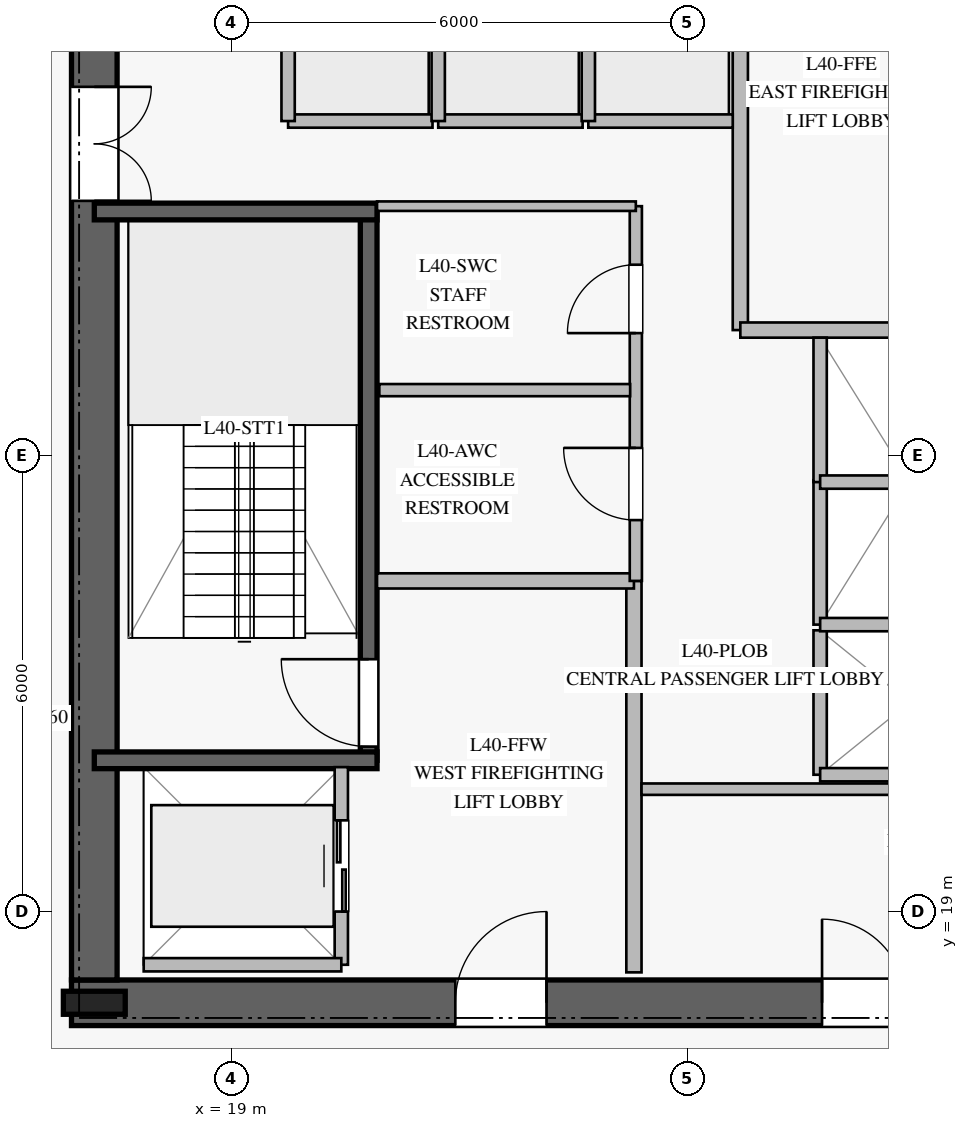
"""IFC4 building model, lengths in metres.
Left out: names, types, materials, properties, quantities, classifications, styles, units other than length and angle.
Written with IfcOpenShell. Run it as: python <this file> out.ifc"""

import sys

from ifc_helpers import new_model, si_unit, direction, frame, frame_2d, origin, origin_2d, place, context, subcontext, project, spatial, rectangle, i_section, extrude, element, fill, save


model = new_model("IFC4")
c1 = context("Model", 3, precision=1e-05, world=origin(), true_north=direction((0.0, 1.0)))
c2 = subcontext(c1, "Body", "Model", "MODEL_VIEW")
j1 = project(units=[si_unit("LENGTHUNIT", "METRE"), si_unit("PLANEANGLEUNIT", "RADIAN")], contexts=[c1])
p1 = place(None, origin())
s1 = spatial("IfcSite", under=j1, at=p1, CompositionType="ELEMENT")
p2 = place(p1, origin())
s2 = spatial("IfcBuilding", under=s1, at=p2, CompositionType="ELEMENT")
p3 = place(p2, frame((0.0, 0.0, 166.4)))
s3 = spatial("IfcBuildingStorey", under=s2, at=p3, CompositionType="ELEMENT", Elevation=166.4)
p4 = place(p3, frame((16.9, 17.8, 0.0), z_axis=(0.0, 0.0, 1.0), x_axis=(1.0, 0.0, 0.0)))
e1 = element("IfcWall", 1, at=p4, inside=s3, PredefinedType="SHEAR", context=c2, shape_type="SweptSolid", body=[
    extrude(rectangle(XDim=16.2, YDim=0.6, at=frame_2d((8.1, 0.0))), origin(), (0.0, 0.0, 1.0), 3.7),
])
p5 = place(p4, frame((5.05, 0.0, 0.0)))
e2 = element("IfcOpeningElement", 2, at=p5, cuts=e1, PredefinedType="OPENING", context=c2, shape_type="SweptSolid", body=[
    extrude(rectangle(XDim=1.2, YDim=2.25, at=frame_2d((0.6, 1.125))), frame((0.0, 0.31, 0.0), z_axis=(0.0, -1.0, 0.0), x_axis=(1.0, 0.0, 0.0)), (0.0, 0.0, 1.0), 0.62),
])
p6 = place(p4, frame((14.0, 0.0, 0.0)))
e3 = element("IfcOpeningElement", 3, at=p6, cuts=e1, PredefinedType="OPENING", context=c2, shape_type="SweptSolid", body=[
    extrude(rectangle(XDim=0.9, YDim=2.1, at=frame_2d((0.45, 1.05))), frame((0.0, 0.31, 0.0), z_axis=(0.0, -1.0, 0.0), x_axis=(1.0, 0.0, 0.0)), (0.0, 0.0, 1.0), 0.62),
])
p7 = place(p4, frame((9.875, 0.0, 0.0)))
e4 = element("IfcOpeningElement", 4, at=p7, cuts=e1, PredefinedType="OPENING", context=c2, shape_type="SweptSolid", body=[
    extrude(rectangle(XDim=1.1, YDim=2.2, at=frame_2d((0.55, 1.1))), frame((0.0, 0.31, 0.0), z_axis=(0.0, -1.0, 0.0), x_axis=(1.0, 0.0, 0.0)), (0.0, 0.0, 1.0), 0.62),
])
p8 = place(p3, frame((17.2, 31.9, 0.0), z_axis=(0.0, 0.0, 1.0), x_axis=(0.0, -1.0, 0.0)))
e5 = element("IfcWall", 5, at=p8, inside=s3, PredefinedType="SHEAR", context=c2, shape_type="SweptSolid", body=[
    extrude(rectangle(XDim=13.8, YDim=0.6, at=frame_2d((6.9, 0.0))), origin(), (0.0, 0.0, 1.0), 3.7),
])
p9 = place(p8, frame((2.05, 0.0, 0.0)))
e6 = element("IfcOpeningElement", 6, at=p9, cuts=e5, PredefinedType="OPENING", context=c2, shape_type="SweptSolid", body=[
    extrude(rectangle(XDim=1.5, YDim=2.2, at=frame_2d((0.75, 1.1))), frame((0.0, 0.31, 0.0), z_axis=(0.0, -1.0, 0.0), x_axis=(1.0, 0.0, 0.0)), (0.0, 0.0, 1.0), 0.62),
])
p10 = place(p3, frame((17.2, 17.8, 0.0), z_axis=(0.0, 0.0, 1.0), x_axis=(1.0, 0.0, 0.0)))
e7 = element("IfcColumn", 7, at=p10, inside=s3, PredefinedType="COLUMN", context=c2, shape_type="SweptSolid", body=[
    extrude(i_section(OverallWidth=0.303, OverallDepth=0.814, WebThickness=0.021, FlangeThickness=0.04, at=origin_2d()), origin(), (0.0, 0.0, 1.0), 4.0),
])
p11 = place(p3, frame((20.81, 20.99, 0.0), z_axis=(0.0, 0.0, 1.0), x_axis=(0.0, 1.0, 0.0)))
e8 = element("IfcWall", 8, at=p11, inside=s3, PredefinedType="SOLIDWALL", context=c2, shape_type="SweptSolid", body=[
    extrude(rectangle(XDim=7.22, YDim=0.22, at=frame_2d((3.61, 0.0))), origin(), (0.0, 0.0, 1.0), 3.7),
])
p12 = place(p11, frame((0.18, 0.0, 0.0)))
e9 = element("IfcOpeningElement", 9, at=p12, cuts=e8, PredefinedType="OPENING", context=c2, shape_type="SweptSolid", body=[
    extrude(rectangle(XDim=1.15, YDim=2.2, at=frame_2d((0.575, 1.1))), frame((0.0, 0.12, 0.0), z_axis=(0.0, -1.0, 0.0), x_axis=(1.0, 0.0, 0.0)), (0.0, 0.0, 1.0), 0.24),
])
for number, where, z_axis, x_axis in (
    (10, (17.2, 20.99, 0.0), (0.0, 0.0, 1.0), (1.0, 0.0, 0.0)),
    (11, (17.2, 28.21, 0.0), (0.0, 0.0, 1.0), (1.0, 0.0, 0.0)),
):
    element("IfcWall", number, at=place(p3, frame(where, z_axis=z_axis, x_axis=x_axis)), inside=s3, PredefinedType="SOLIDWALL", context=c2, shape_type="SweptSolid", body=[
        extrude(rectangle(XDim=3.72, YDim=0.22, at=frame_2d((1.86, 0.0))), origin(), (0.0, 0.0, 1.0), 3.7),
    ])
p13 = place(p3, frame((24.3, 18.2, 0.0), z_axis=(0.0, 0.0, 1.0), x_axis=(0.0, 1.0, 0.0)))
e12 = element("IfcWall", 12, at=p13, inside=s3, PredefinedType="PARTITIONING", context=c2, shape_type="SweptSolid", body=[
    extrude(rectangle(XDim=5.15, YDim=0.2, at=frame_2d((2.575, 0.0))), origin(), (0.0, 0.0, 1.0), 3.7),
])
p14 = place(p3, frame((20.92, 23.35, 0.0), z_axis=(0.0, 0.0, 1.0), x_axis=(1.0, 0.0, 0.0)))
e13 = element("IfcWall", 13, at=p14, inside=s3, PredefinedType="PARTITIONING", context=c2, shape_type="SweptSolid", body=[
    extrude(rectangle(XDim=3.38, YDim=0.2, at=frame_2d((1.69, 0.0))), origin(), (0.0, 0.0, 1.0), 3.7),
])
p15 = place(p3, frame((25.7, 26.65, 0.0), z_axis=(0.0, 0.0, 1.0), x_axis=(0.0, 1.0, 0.0)))
e14 = element("IfcWall", 14, at=p15, inside=s3, PredefinedType="PARTITIONING", context=c2, shape_type="SweptSolid", body=[
    extrude(rectangle(XDim=5.15, YDim=0.2, at=frame_2d((2.575, 0.0))), origin(), (0.0, 0.0, 1.0), 3.7),
])
p16 = place(p3, frame((25.7, 26.65, 0.0), z_axis=(0.0, 0.0, 1.0), x_axis=(1.0, 0.0, 0.0)))
e15 = element("IfcWall", 15, at=p16, inside=s3, PredefinedType="PARTITIONING", context=c2, shape_type="SweptSolid", body=[
    extrude(rectangle(XDim=3.38, YDim=0.2, at=frame_2d((1.69, 0.0))), origin(), (0.0, 0.0, 1.0), 3.7),
])
p17 = place(p3, frame((24.325, 23.35, 0.0), z_axis=(0.0, 0.0, 1.0), x_axis=(0.0, 1.0, 0.0)))
e16 = element("IfcWall", 16, at=p17, inside=s3, PredefinedType="PLUMBINGWALL", context=c2, shape_type="SweptSolid", body=[
    extrude(rectangle(XDim=4.93, YDim=0.16, at=frame_2d((2.465, 0.0))), origin(), (0.0, 0.0, 1.0), 3.7),
])
p18 = place(p17, frame((0.8, 0.0, 0.0)))
e17 = element("IfcOpeningElement", 17, at=p18, cuts=e16, PredefinedType="OPENING", context=c2, shape_type="SweptSolid", body=[
    extrude(rectangle(XDim=0.95, YDim=2.1, at=frame_2d((0.475, 1.05))), frame((0.0, 0.09, 0.0), z_axis=(0.0, -1.0, 0.0), x_axis=(1.0, 0.0, 0.0)), (0.0, 0.0, 1.0), 0.18),
])
p19 = place(p17, frame((3.26, 0.0, 0.0)))
e18 = element("IfcOpeningElement", 18, at=p19, cuts=e16, PredefinedType="OPENING", context=c2, shape_type="SweptSolid", body=[
    extrude(rectangle(XDim=0.9, YDim=2.1, at=frame_2d((0.45, 1.05))), frame((0.0, 0.09, 0.0), z_axis=(0.0, -1.0, 0.0), x_axis=(1.0, 0.0, 0.0)), (0.0, 0.0, 1.0), 0.18),
])
p20 = place(p3, frame((20.92, 28.28, 0.0), z_axis=(0.0, 0.0, 1.0), x_axis=(1.0, 0.0, 0.0)))
e19 = element("IfcWall", 19, at=p20, inside=s3, PredefinedType="PARTITIONING", context=c2, shape_type="SweptSolid", body=[
    extrude(rectangle(XDim=3.405, YDim=0.125, at=frame_2d((1.703, 0.0))), origin(), (0.0, 0.0, 1.0), 3.7),
])
p21 = place(p3, frame((20.95, 25.86, 0.0), z_axis=(0.0, 0.0, 1.0), x_axis=(1.0, 0.0, 0.0)))
e20 = element("IfcWall", 20, at=p21, inside=s3, PredefinedType="PLUMBINGWALL", context=c2, shape_type="SweptSolid", body=[
    extrude(rectangle(XDim=3.3, YDim=0.16, at=frame_2d((1.65, 0.0))), origin(), (0.0, 0.0, 1.0), 3.7),
])
p22 = place(p3, frame((24.4, 20.61, 0.0), z_axis=(0.0, 0.0, 1.0), x_axis=(1.0, 0.0, 0.0)))
e21 = element("IfcWall", 21, at=p22, inside=s3, PredefinedType="PARTITIONING", context=c2, shape_type="SweptSolid", body=[
    extrude(rectangle(XDim=5.9, YDim=0.15, at=frame_2d((2.95, 0.0))), origin(), (0.0, 0.0, 1.0), 3.7),
])
p23 = place(p3, frame((19.75, 29.4, 0.0), z_axis=(0.0, 0.0, 1.0), x_axis=(1.0, 0.0, 0.0)))
e22 = element("IfcWall", 22, at=p23, inside=s3, PredefinedType="PARTITIONING", context=c2, shape_type="SweptSolid", body=[
    extrude(rectangle(XDim=1.9, YDim=0.175, at=frame_2d((0.95, 0.0))), origin(), (0.0, 0.0, 1.0), 3.7),
])
p24 = place(p3, frame((19.75, 29.4, 0.0), z_axis=(0.0, 0.0, 1.0), x_axis=(0.0, 1.0, 0.0)))
e23 = element("IfcWall", 23, at=p24, inside=s3, PredefinedType="PARTITIONING", context=c2, shape_type="SweptSolid", body=[
    extrude(rectangle(XDim=2.35, YDim=0.175, at=frame_2d((1.175, 0.0))), origin(), (0.0, 0.0, 1.0), 3.7),
])
p25 = place(p3, frame((21.725, 29.4, 0.0), z_axis=(0.0, 0.0, 1.0), x_axis=(1.0, 0.0, 0.0)))
e24 = element("IfcWall", 24, at=p25, inside=s3, PredefinedType="PARTITIONING", context=c2, shape_type="SweptSolid", body=[
    extrude(rectangle(XDim=1.9, YDim=0.175, at=frame_2d((0.95, 0.0))), origin(), (0.0, 0.0, 1.0), 3.7),
])
p26 = place(p3, frame((21.725, 29.4, 0.0), z_axis=(0.0, 0.0, 1.0), x_axis=(0.0, 1.0, 0.0)))
e25 = element("IfcWall", 25, at=p26, inside=s3, PredefinedType="PARTITIONING", context=c2, shape_type="SweptSolid", body=[
    extrude(rectangle(XDim=2.35, YDim=0.175, at=frame_2d((1.175, 0.0))), origin(), (0.0, 0.0, 1.0), 3.7),
])
p27 = place(p3, frame((23.7, 29.4, 0.0), z_axis=(0.0, 0.0, 1.0), x_axis=(1.0, 0.0, 0.0)))
e26 = element("IfcWall", 26, at=p27, inside=s3, PredefinedType="PARTITIONING", context=c2, shape_type="SweptSolid", body=[
    extrude(rectangle(XDim=1.9, YDim=0.175, at=frame_2d((0.95, 0.0))), origin(), (0.0, 0.0, 1.0), 3.7),
])
p28 = place(p3, frame((23.7, 29.4, 0.0), z_axis=(0.0, 0.0, 1.0), x_axis=(0.0, 1.0, 0.0)))
e27 = element("IfcWall", 27, at=p28, inside=s3, PredefinedType="PARTITIONING", context=c2, shape_type="SweptSolid", body=[
    extrude(rectangle(XDim=2.35, YDim=0.175, at=frame_2d((1.175, 0.0))), origin(), (0.0, 0.0, 1.0), 3.7),
])
p29 = place(p3, frame((26.75, 20.8, 0.0), z_axis=(0.0, 0.0, 1.0), x_axis=(0.0, 1.0, 0.0)))
e28 = element("IfcWall", 28, at=p29, inside=s3, PredefinedType="PARTITIONING", context=c2, shape_type="SweptSolid", body=[
    extrude(rectangle(XDim=1.9, YDim=0.175, at=frame_2d((0.95, 0.0))), origin(), (0.0, 0.0, 1.0), 3.7),
])
p30 = place(p3, frame((26.75, 20.8, 0.0), z_axis=(0.0, 0.0, 1.0), x_axis=(1.0, 0.0, 0.0)))
e29 = element("IfcWall", 29, at=p30, inside=s3, PredefinedType="PARTITIONING", context=c2, shape_type="SweptSolid", body=[
    extrude(rectangle(XDim=2.35, YDim=0.175, at=frame_2d((1.175, 0.0))), origin(), (0.0, 0.0, 1.0), 3.7),
])
p31 = place(p3, frame((26.75, 22.775, 0.0), z_axis=(0.0, 0.0, 1.0), x_axis=(0.0, 1.0, 0.0)))
e30 = element("IfcWall", 30, at=p31, inside=s3, PredefinedType="PARTITIONING", context=c2, shape_type="SweptSolid", body=[
    extrude(rectangle(XDim=1.9, YDim=0.175, at=frame_2d((0.95, 0.0))), origin(), (0.0, 0.0, 1.0), 3.7),
])
p32 = place(p3, frame((26.75, 22.775, 0.0), z_axis=(0.0, 0.0, 1.0), x_axis=(1.0, 0.0, 0.0)))
e31 = element("IfcWall", 31, at=p32, inside=s3, PredefinedType="PARTITIONING", context=c2, shape_type="SweptSolid", body=[
    extrude(rectangle(XDim=2.35, YDim=0.175, at=frame_2d((1.175, 0.0))), origin(), (0.0, 0.0, 1.0), 3.7),
])
p33 = place(p3, frame((26.75, 24.65, 0.0), z_axis=(0.0, 0.0, 1.0), x_axis=(0.0, 1.0, 0.0)))
e32 = element("IfcWall", 32, at=p33, inside=s3, PredefinedType="PARTITIONING", context=c2, shape_type="SweptSolid", body=[
    extrude(rectangle(XDim=1.9, YDim=0.175, at=frame_2d((0.95, 0.0))), origin(), (0.0, 0.0, 1.0), 3.7),
])
p34 = place(p3, frame((26.75, 24.65, 0.0), z_axis=(0.0, 0.0, 1.0), x_axis=(1.0, 0.0, 0.0)))
e33 = element("IfcWall", 33, at=p34, inside=s3, PredefinedType="PARTITIONING", context=c2, shape_type="SweptSolid", body=[
    extrude(rectangle(XDim=2.35, YDim=0.175, at=frame_2d((1.175, 0.0))), origin(), (0.0, 0.0, 1.0), 3.7),
])
p35 = place(p3, frame((20.45, 18.3, 0.0), z_axis=(0.0, 0.0, 1.0), x_axis=(0.0, 1.0, 0.0)))
e34 = element("IfcWall", 34, at=p35, inside=s3, PredefinedType="PARTITIONING", context=c2, shape_type="SweptSolid", body=[
    extrude(rectangle(XDim=2.6, YDim=0.175, at=frame_2d((1.3, 0.0))), origin(), (0.0, 0.0, 1.0), 3.7),
])
p36 = place(p35, frame((0.7, 0.0, 0.0)))
e35 = element("IfcOpeningElement", 35, at=p36, cuts=e34, PredefinedType="OPENING", context=c2, shape_type="SweptSolid", body=[
    extrude(rectangle(XDim=1.2, YDim=2.2, at=frame_2d((0.6, 1.1))), frame((0.0, 0.098, 0.0), z_axis=(0.0, -1.0, 0.0), x_axis=(1.0, 0.0, 0.0)), (0.0, 0.0, 1.0), 0.195),
])
p37 = place(p3, frame((17.85, 18.3, 0.0), z_axis=(0.0, 0.0, 1.0), x_axis=(1.0, 0.0, 0.0)))
e36 = element("IfcWall", 36, at=p37, inside=s3, PredefinedType="PARTITIONING", context=c2, shape_type="SweptSolid", body=[
    extrude(rectangle(XDim=2.6, YDim=0.175, at=frame_2d((1.3, 0.0))), origin(), (0.0, 0.0, 1.0), 3.7),
])
p38 = place(p12, origin())
e37 = element("IfcDoor", 37, at=p38, inside=s3, OperationType="SINGLE_SWING_RIGHT", PredefinedType="DOOR", context=c2, shape_type="SweptSolid", body=[
    extrude(rectangle(XDim=1.15, YDim=2.2, at=frame_2d((0.575, 1.1))), frame((0.0, 0.025, 0.0), z_axis=(0.0, -1.0, 0.0), x_axis=(1.0, 0.0, 0.0)), (0.0, 0.0, 1.0), 0.05),
])
fill(e9, e37)
p39 = place(p5, origin())
e38 = element("IfcDoor", 38, at=p39, inside=s3, OperationType="SINGLE_SWING_RIGHT", PredefinedType="DOOR", context=c2, shape_type="SweptSolid", body=[
    extrude(rectangle(XDim=1.2, YDim=2.25, at=frame_2d((0.6, 1.125))), frame((0.0, 0.025, 0.0), z_axis=(0.0, -1.0, 0.0), x_axis=(1.0, 0.0, 0.0)), (0.0, 0.0, 1.0), 0.05),
])
fill(e2, e38)
p40 = place(p9, origin())
e39 = element("IfcDoor", 39, at=p40, inside=s3, OperationType="DOUBLE_DOOR_SINGLE_SWING", PredefinedType="DOOR", context=c2, shape_type="SweptSolid", body=[
    extrude(rectangle(XDim=1.5, YDim=2.2, at=frame_2d((0.75, 1.1))), frame((0.0, 0.025, 0.0), z_axis=(0.0, -1.0, 0.0), x_axis=(1.0, 0.0, 0.0)), (0.0, 0.0, 1.0), 0.05),
])
fill(e6, e39)
p41 = place(p18, origin())
e40 = element("IfcDoor", 40, at=p41, inside=s3, OperationType="SINGLE_SWING_RIGHT", PredefinedType="DOOR", context=c2, shape_type="SweptSolid", body=[
    extrude(rectangle(XDim=0.95, YDim=2.1, at=frame_2d((0.475, 1.05))), frame((0.0, 0.025, 0.0), z_axis=(0.0, -1.0, 0.0), x_axis=(1.0, 0.0, 0.0)), (0.0, 0.0, 1.0), 0.05),
])
fill(e17, e40)
p42 = place(p19, origin())
e41 = element("IfcDoor", 41, at=p42, inside=s3, OperationType="SINGLE_SWING_LEFT", PredefinedType="DOOR", context=c2, shape_type="SweptSolid", body=[
    extrude(rectangle(XDim=0.9, YDim=2.1, at=frame_2d((0.45, 1.05))), frame((0.0, 0.025, 0.0), z_axis=(0.0, -1.0, 0.0), x_axis=(1.0, 0.0, 0.0)), (0.0, 0.0, 1.0), 0.05),
])
fill(e18, e41)
p43 = place(p7, origin())
e42 = element("IfcDoor", 42, at=p43, inside=s3, OperationType="SINGLE_SWING_LEFT", PredefinedType="DOOR", context=c2, shape_type="SweptSolid", body=[
    extrude(rectangle(XDim=1.1, YDim=2.2, at=frame_2d((0.55, 1.1))), frame((0.0, 0.025, 0.0), z_axis=(0.0, -1.0, 0.0), x_axis=(1.0, 0.0, 0.0)), (0.0, 0.0, 1.0), 0.05),
])
fill(e4, e42)
p44 = place(p36, origin())
e43 = element("IfcDoor", 43, at=p44, inside=s3, OperationType="DOUBLE_DOOR_SLIDING", PredefinedType="DOOR", context=c2, shape_type="SweptSolid", body=[
    extrude(rectangle(XDim=1.2, YDim=2.2, at=frame_2d((0.6, 1.1))), frame((0.0, 0.025, 0.0), z_axis=(0.0, -1.0, 0.0), x_axis=(1.0, 0.0, 0.0)), (0.0, 0.0, 1.0), 0.05),
])
fill(e35, e43)
save(model, sys.argv[1])
